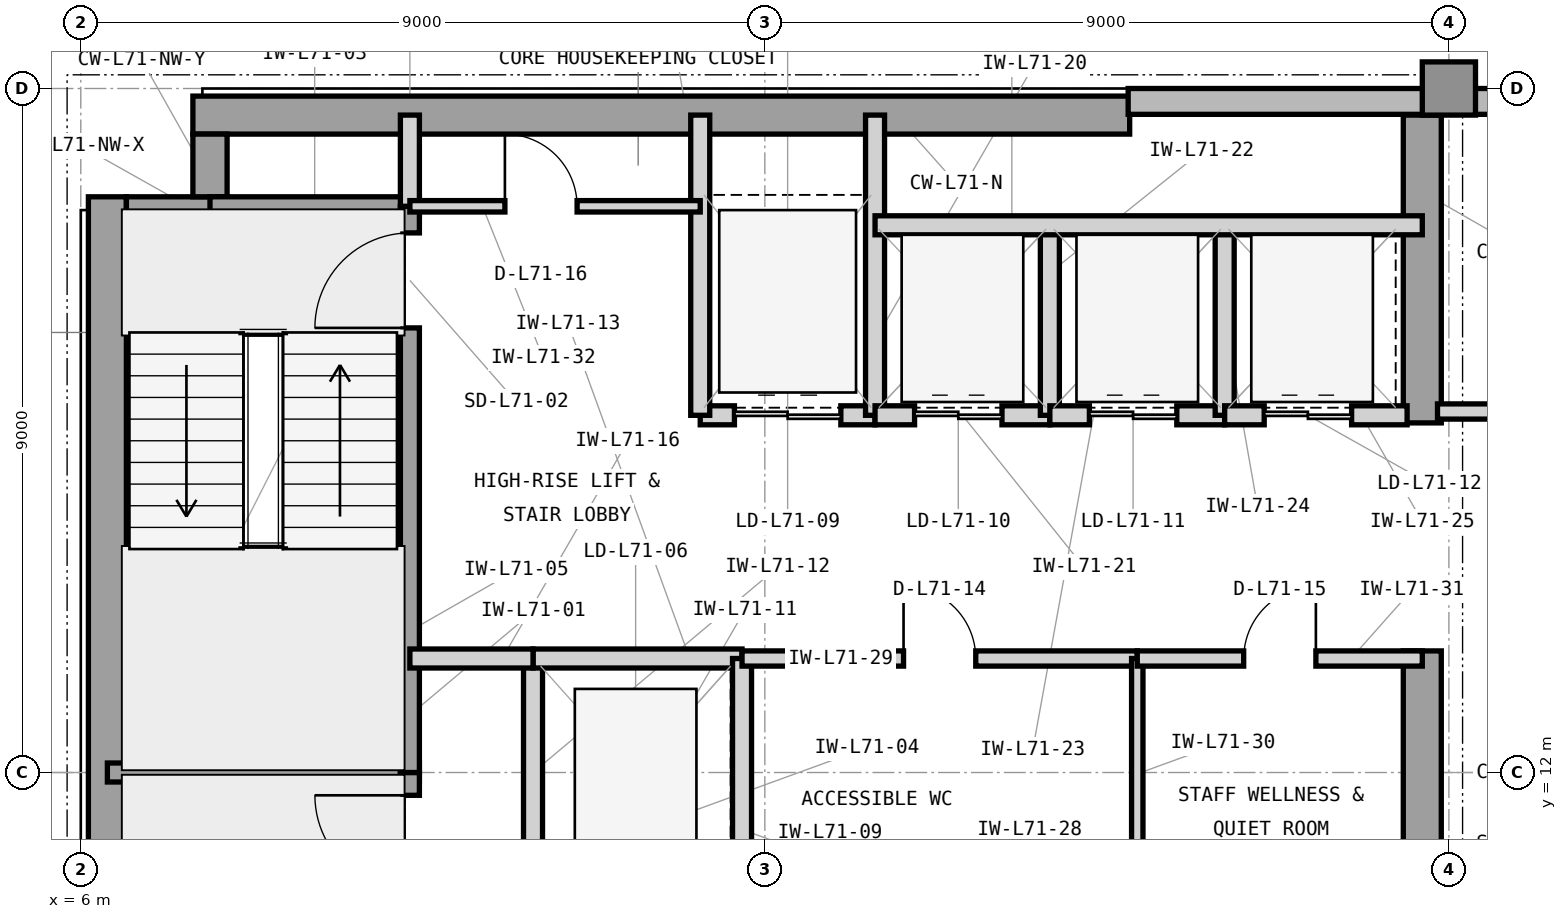
"""IFC4 building model, lengths in metres.
Left out: names, types, materials, properties, quantities, classifications, styles, units other than length and angle.
Written with IfcOpenShell. Run it as: python <this file> out.ifc"""

import sys

from ifc_helpers import new_model, si_unit, direction, frame, frame_2d, origin, origin_2d, place, context, subcontext, project, spatial, rectangle, extrude, element, fill, save


model = new_model("IFC4")
c1 = context("Model", 3, precision=1e-05, world=origin(), true_north=direction((0.0, 1.0)))
c2 = subcontext(c1, "Body", "Model", "MODEL_VIEW")
j1 = project(units=[si_unit("LENGTHUNIT", "METRE"), si_unit("PLANEANGLEUNIT", "RADIAN")], contexts=[c1])
p1 = place(None, origin())
s1 = spatial("IfcSite", under=j1, at=p1, CompositionType="ELEMENT")
p2 = place(p1, origin())
s2 = spatial("IfcBuilding", under=s1, at=p2, CompositionType="ELEMENT")
p3 = place(p2, frame((0.0, 0.0, 289.8)))
s3 = spatial("IfcBuildingStorey", under=s2, at=p3, CompositionType="ELEMENT", Elevation=289.8)
p4 = place(p3, frame((6.35, 4.425, 0.0), z_axis=(0.0, 0.0, 1.0), x_axis=(0.0, 1.0, 0.0)))
e1 = element("IfcWall", 1, at=p4, inside=s3, PredefinedType="SHEAR", context=c2, shape_type="SweptSolid", body=[
    extrude(rectangle(XDim=15.15, YDim=0.5, at=frame_2d((7.575, 0.0))), origin(), (0.0, 0.0, 1.0), 3.9),
])
p5 = place(p3, frame((7.475, 20.65, 0.0), z_axis=(0.0, 0.0, 1.0), x_axis=(1.0, 0.0, 0.0)))
e2 = element("IfcWall", 2, at=p5, inside=s3, PredefinedType="SHEAR", context=c2, shape_type="SweptSolid", body=[
    extrude(rectangle(XDim=12.325, YDim=0.5, at=frame_2d((6.163, 0.0))), origin(), (0.0, 0.0, 1.0), 3.9),
])
p6 = place(p3, frame((23.65, 10.4, 0.0), z_axis=(0.0, 0.0, 1.0), x_axis=(0.0, 1.0, 0.0)))
e3 = element("IfcWall", 3, at=p6, inside=s3, PredefinedType="SHEAR", context=c2, shape_type="SweptSolid", body=[
    extrude(rectangle(XDim=3.2, YDim=0.5, at=frame_2d((1.6, 0.0))), origin(), (0.0, 0.0, 1.0), 3.9),
])
p7 = place(p3, frame((23.65, 16.6, 0.0), z_axis=(0.0, 0.0, 1.0), x_axis=(0.0, 1.0, 0.0)))
e4 = element("IfcWall", 4, at=p7, inside=s3, PredefinedType="SHEAR", context=c2, shape_type="SweptSolid", body=[
    extrude(rectangle(XDim=4.05, YDim=0.5, at=frame_2d((2.025, 0.0))), origin(), (0.0, 0.0, 1.0), 3.9),
])
p8 = place(p3, frame((6.6, 19.35, 0.0), z_axis=(0.0, 0.0, 1.0), x_axis=(1.0, 0.0, 0.0)))
e5 = element("IfcWall", 5, at=p8, inside=s3, PredefinedType="SHEAR", context=c2, shape_type="SweptSolid", body=[
    extrude(rectangle(XDim=1.325, YDim=0.45, at=frame_2d((0.663, 0.0))), origin(), (0.0, 0.0, 1.0), 3.9),
])
p9 = place(p3, frame((7.7, 19.575, 0.0), z_axis=(0.0, 0.0, 1.0), x_axis=(0.0, 1.0, 0.0)))
e6 = element("IfcWall", 6, at=p9, inside=s3, PredefinedType="SHEAR", context=c2, shape_type="SweptSolid", body=[
    extrude(rectangle(XDim=0.825, YDim=0.45, at=frame_2d((0.413, 0.0))), origin(), (0.0, 0.0, 1.0), 3.9),
])
p10 = place(p3, frame((24.0, 21.0, 0.0), z_axis=(0.0, 0.0, 1.0), x_axis=(1.0, 0.0, 0.0)))
e7 = element("IfcColumn", 7, at=p10, inside=s3, PredefinedType="COLUMN", context=c2, shape_type="SweptSolid", body=[
    extrude(rectangle(XDim=0.7, YDim=0.7, at=origin_2d()), origin(), (0.0, 0.0, 1.0), 3.9),
])
p11 = place(p3, frame((49.4, 20.83, 0.0), z_axis=(0.0, 0.0, 1.0), x_axis=(-1.0, 0.0, 0.0)))
e8 = element("IfcWall", 8, at=p11, inside=s3, PredefinedType="STANDARD", context=c2, shape_type="SweptSolid", body=[
    extrude(rectangle(XDim=29.62, YDim=0.34, at=frame_2d((14.81, 0.0))), origin(), (0.0, 0.0, 1.0), 3.715),
])
p12 = place(p11, frame((22.826, 0.0, 0.8)))
e9 = element("IfcOpeningElement", 9, at=p12, cuts=e8, PredefinedType="OPENING", context=c2, shape_type="SweptSolid", body=[
    extrude(rectangle(XDim=1.9, YDim=2.35, at=frame_2d((0.95, 1.175))), frame((0.0, 0.18, 0.0), z_axis=(0.0, -1.0, 0.0), x_axis=(1.0, 0.0, 0.0)), (0.0, 0.0, 1.0), 0.36),
])
p13 = place(p11, frame((12.825, 0.0, 0.8)))
e10 = element("IfcOpeningElement", 10, at=p13, cuts=e8, PredefinedType="OPENING", context=c2, shape_type="SweptSolid", body=[
    extrude(rectangle(XDim=2.6, YDim=2.35, at=frame_2d((1.3, 1.175))), frame((0.0, 0.18, 0.0), z_axis=(0.0, -1.0, 0.0), x_axis=(1.0, 0.0, 0.0)), (0.0, 0.0, 1.0), 0.36),
])
p14 = place(p11, frame((8.375, 0.0, 0.8)))
e11 = element("IfcOpeningElement", 11, at=p14, cuts=e8, PredefinedType="OPENING", context=c2, shape_type="SweptSolid", body=[
    extrude(rectangle(XDim=2.6, YDim=2.35, at=frame_2d((1.3, 1.175))), frame((0.0, 0.18, 0.0), z_axis=(0.0, -1.0, 0.0), x_axis=(1.0, 0.0, 0.0)), (0.0, 0.0, 1.0), 0.36),
])
p15 = place(p3, frame((6.35, 12.0, 0.0), z_axis=(0.0, 0.0, 1.0), x_axis=(1.0, 0.0, 0.0)))
e12 = element("IfcWall", 12, at=p15, inside=s3, PredefinedType="SHEAR", context=c2, shape_type="SweptSolid", body=[
    extrude(rectangle(XDim=4.105, YDim=0.25, at=frame_2d((2.052, 0.0))), origin(), (0.0, 0.0, 1.0), 3.9),
])
p16 = place(p3, frame((7.7, 19.45, 0.0), z_axis=(0.0, 0.0, 1.0), x_axis=(1.0, 0.0, 0.0)))
e13 = element("IfcWall", 13, at=p16, inside=s3, PredefinedType="SHEAR", context=c2, shape_type="SweptSolid", body=[
    extrude(rectangle(XDim=2.755, YDim=0.25, at=frame_2d((1.377, 0.0))), origin(), (0.0, 0.0, 1.0), 3.9),
])
p17 = place(p3, frame((10.33, 4.55, 0.0), z_axis=(0.0, 0.0, 1.0), x_axis=(0.0, 1.0, 0.0)))
e14 = element("IfcWall", 14, at=p17, inside=s3, PredefinedType="SHEAR", context=c2, shape_type="SweptSolid", body=[
    extrude(rectangle(XDim=7.45, YDim=0.25, at=frame_2d((3.725, 0.0))), origin(), (0.0, 0.0, 1.0), 3.9),
])
p18 = place(p17, frame((5.9, 0.0, 0.0)))
e15 = element("IfcOpeningElement", 15, at=p18, cuts=e14, PredefinedType="OPENING", context=c2, shape_type="SweptSolid", body=[
    extrude(rectangle(XDim=1.25, YDim=2.2, at=frame_2d((0.625, 1.1))), frame((0.0, 0.135, 0.0), z_axis=(0.0, -1.0, 0.0), x_axis=(1.0, 0.0, 0.0)), (0.0, 0.0, 1.0), 0.27),
])
p19 = place(p3, frame((10.33, 12.0, 0.0), z_axis=(0.0, 0.0, 1.0), x_axis=(0.0, 1.0, 0.0)))
e16 = element("IfcWall", 16, at=p19, inside=s3, PredefinedType="SHEAR", context=c2, shape_type="SweptSolid", body=[
    extrude(rectangle(XDim=7.45, YDim=0.25, at=frame_2d((3.725, 0.0))), origin(), (0.0, 0.0, 1.0), 3.9),
])
p20 = place(p19, frame((5.85, 0.0, 0.0)))
e17 = element("IfcOpeningElement", 17, at=p20, cuts=e16, PredefinedType="OPENING", context=c2, shape_type="SweptSolid", body=[
    extrude(rectangle(XDim=1.25, YDim=2.2, at=frame_2d((0.625, 1.1))), frame((0.0, 0.135, 0.0), z_axis=(0.0, -1.0, 0.0), x_axis=(1.0, 0.0, 0.0)), (0.0, 0.0, 1.0), 0.27),
])
p21 = place(p3, frame((10.33, 19.45, 0.0), z_axis=(0.0, 0.0, 1.0), x_axis=(0.0, 1.0, 0.0)))
e18 = element("IfcWall", 18, at=p21, inside=s3, PredefinedType="PARTITIONING", context=c2, shape_type="SweptSolid", body=[
    extrude(rectangle(XDim=1.2, YDim=0.25, at=frame_2d((0.6, 0.0))), origin(), (0.0, 0.0, 1.0), 3.705),
])
p22 = place(p3, frame((11.95, 10.5, 0.0), z_axis=(0.0, 0.0, 1.0), x_axis=(0.0, 1.0, 0.0)))
e19 = element("IfcWall", 19, at=p22, inside=s3, PredefinedType="PARTITIONING", context=c2, shape_type="SweptSolid", body=[
    extrude(rectangle(XDim=3.0, YDim=0.25, at=frame_2d((1.5, 0.0))), origin(), (0.0, 0.0, 1.0), 3.705),
])
p23 = place(p3, frame((11.95, 13.5, 0.0), z_axis=(0.0, 0.0, 1.0), x_axis=(1.0, 0.0, 0.0)))
e20 = element("IfcWall", 20, at=p23, inside=s3, PredefinedType="PARTITIONING", context=c2, shape_type="SweptSolid", body=[
    extrude(rectangle(XDim=2.75, YDim=0.25, at=frame_2d((1.375, 0.0))), origin(), (0.0, 0.0, 1.0), 3.354),
])
p24 = place(p3, frame((14.7, 10.5, 0.0), z_axis=(0.0, 0.0, 1.0), x_axis=(0.0, 1.0, 0.0)))
e21 = element("IfcWall", 21, at=p24, inside=s3, PredefinedType="PARTITIONING", context=c2, shape_type="SweptSolid", body=[
    extrude(rectangle(XDim=3.0, YDim=0.25, at=frame_2d((1.5, 0.0))), origin(), (0.0, 0.0, 1.0), 3.705),
])
p25 = place(p3, frame((10.33, 13.5, 0.0), z_axis=(0.0, 0.0, 1.0), x_axis=(1.0, 0.0, 0.0)))
e22 = element("IfcWall", 22, at=p25, inside=s3, PredefinedType="PARTITIONING", context=c2, shape_type="SweptSolid", body=[
    extrude(rectangle(XDim=1.62, YDim=0.25, at=frame_2d((0.81, 0.0))), origin(), (0.0, 0.0, 1.0), 3.354),
])
p26 = place(p3, frame((14.15, 16.7, 0.0), z_axis=(0.0, 0.0, 1.0), x_axis=(1.0, 0.0, 0.0)))
e23 = element("IfcWall", 23, at=p26, inside=s3, PredefinedType="PARTITIONING", context=c2, shape_type="SweptSolid", body=[
    extrude(rectangle(XDim=2.3, YDim=0.25, at=frame_2d((1.15, 0.0))), origin(), (0.0, 0.0, 1.0), 3.354),
])
p27 = place(p26, frame((0.45, 0.0, 0.0)))
e24 = element("IfcOpeningElement", 24, at=p27, cuts=e23, PredefinedType="OPENING", context=c2, shape_type="SweptSolid", body=[
    extrude(rectangle(XDim=1.4, YDim=2.35, at=frame_2d((0.7, 1.175))), frame((0.0, 0.135, 0.0), z_axis=(0.0, -1.0, 0.0), x_axis=(1.0, 0.0, 0.0)), (0.0, 0.0, 1.0), 0.27),
])
for number, where, z_axis, x_axis in (
    (25, (14.15, 16.7, 0.0), (0.0, 0.0, 1.0), (0.0, 1.0, 0.0)),
    (26, (16.45, 16.7, 0.0), (0.0, 0.0, 1.0), (0.0, 1.0, 0.0)),
):
    element("IfcWall", number, at=place(p3, frame(where, z_axis=z_axis, x_axis=x_axis)), inside=s3, PredefinedType="PARTITIONING", context=c2, shape_type="SweptSolid", body=[
        extrude(rectangle(XDim=3.95, YDim=0.25, at=frame_2d((1.975, 0.0))), origin(), (0.0, 0.0, 1.0), 3.705),
    ])
p28 = place(p3, frame((16.45, 16.7, 0.0), z_axis=(0.0, 0.0, 1.0), x_axis=(1.0, 0.0, 0.0)))
e27 = element("IfcWall", 27, at=p28, inside=s3, PredefinedType="PARTITIONING", context=c2, shape_type="SweptSolid", body=[
    extrude(rectangle(XDim=2.3, YDim=0.25, at=frame_2d((1.15, 0.0))), origin(), (0.0, 0.0, 1.0), 3.354),
])
p29 = place(p28, frame((0.52, 0.0, 0.0)))
e28 = element("IfcOpeningElement", 28, at=p29, cuts=e27, PredefinedType="OPENING", context=c2, shape_type="SweptSolid", body=[
    extrude(rectangle(XDim=1.15, YDim=2.25, at=frame_2d((0.575, 1.125))), frame((0.0, 0.135, 0.0), z_axis=(0.0, -1.0, 0.0), x_axis=(1.0, 0.0, 0.0)), (0.0, 0.0, 1.0), 0.27),
])
p30 = place(p3, frame((18.75, 16.7, 0.0), z_axis=(0.0, 0.0, 1.0), x_axis=(0.0, 1.0, 0.0)))
e29 = element("IfcWall", 29, at=p30, inside=s3, PredefinedType="PARTITIONING", context=c2, shape_type="SweptSolid", body=[
    extrude(rectangle(XDim=2.5, YDim=0.25, at=frame_2d((1.25, 0.0))), origin(), (0.0, 0.0, 1.0), 3.705),
])
p31 = place(p3, frame((18.75, 16.7, 0.0), z_axis=(0.0, 0.0, 1.0), x_axis=(1.0, 0.0, 0.0)))
e30 = element("IfcWall", 30, at=p31, inside=s3, PredefinedType="PARTITIONING", context=c2, shape_type="SweptSolid", body=[
    extrude(rectangle(XDim=2.3, YDim=0.25, at=frame_2d((1.15, 0.0))), origin(), (0.0, 0.0, 1.0), 3.354),
])
p32 = place(p31, frame((0.52, 0.0, 0.0)))
e31 = element("IfcOpeningElement", 31, at=p32, cuts=e30, PredefinedType="OPENING", context=c2, shape_type="SweptSolid", body=[
    extrude(rectangle(XDim=1.15, YDim=2.25, at=frame_2d((0.575, 1.125))), frame((0.0, 0.135, 0.0), z_axis=(0.0, -1.0, 0.0), x_axis=(1.0, 0.0, 0.0)), (0.0, 0.0, 1.0), 0.27),
])
p33 = place(p3, frame((21.05, 16.7, 0.0), z_axis=(0.0, 0.0, 1.0), x_axis=(0.0, 1.0, 0.0)))
e32 = element("IfcWall", 32, at=p33, inside=s3, PredefinedType="PARTITIONING", context=c2, shape_type="SweptSolid", body=[
    extrude(rectangle(XDim=2.5, YDim=0.25, at=frame_2d((1.25, 0.0))), origin(), (0.0, 0.0, 1.0), 3.705),
])
p34 = place(p3, frame((21.05, 16.7, 0.0), z_axis=(0.0, 0.0, 1.0), x_axis=(1.0, 0.0, 0.0)))
e33 = element("IfcWall", 33, at=p34, inside=s3, PredefinedType="PARTITIONING", context=c2, shape_type="SweptSolid", body=[
    extrude(rectangle(XDim=2.4, YDim=0.25, at=frame_2d((1.2, 0.0))), origin(), (0.0, 0.0, 1.0), 3.354),
])
p35 = place(p34, frame((0.52, 0.0, 0.0)))
e34 = element("IfcOpeningElement", 34, at=p35, cuts=e33, PredefinedType="OPENING", context=c2, shape_type="SweptSolid", body=[
    extrude(rectangle(XDim=1.15, YDim=2.25, at=frame_2d((0.575, 1.125))), frame((0.0, 0.135, 0.0), z_axis=(0.0, -1.0, 0.0), x_axis=(1.0, 0.0, 0.0)), (0.0, 0.0, 1.0), 0.27),
])
p36 = place(p3, frame((16.45, 19.2, 0.0), z_axis=(0.0, 0.0, 1.0), x_axis=(1.0, 0.0, 0.0)))
e35 = element("IfcWall", 35, at=p36, inside=s3, PredefinedType="PARTITIONING", context=c2, shape_type="SweptSolid", body=[
    extrude(rectangle(XDim=7.2, YDim=0.25, at=frame_2d((3.6, 0.0))), origin(), (0.0, 0.0, 1.0), 3.705),
])
p37 = place(p3, frame((14.7, 13.5, 0.0), z_axis=(0.0, 0.0, 1.0), x_axis=(1.0, 0.0, 0.0)))
e36 = element("IfcWall", 36, at=p37, inside=s3, PredefinedType="PARTITIONING", context=c2, shape_type="SweptSolid", body=[
    extrude(rectangle(XDim=5.2, YDim=0.2, at=frame_2d((2.6, 0.0))), origin(), (0.0, 0.0, 1.0), 3.354),
])
p38 = place(p37, frame((2.125, 0.0, 0.0)))
e37 = element("IfcOpeningElement", 37, at=p38, cuts=e36, PredefinedType="OPENING", context=c2, shape_type="SweptSolid", body=[
    extrude(rectangle(XDim=0.95, YDim=2.1, at=frame_2d((0.475, 1.05))), frame((0.0, 0.11, 0.0), z_axis=(0.0, -1.0, 0.0), x_axis=(1.0, 0.0, 0.0)), (0.0, 0.0, 1.0), 0.22),
])
p39 = place(p3, frame((19.9, 10.465, 0.0), z_axis=(0.0, 0.0, 1.0), x_axis=(0.0, 1.0, 0.0)))
e38 = element("IfcWall", 38, at=p39, inside=s3, PredefinedType="PARTITIONING", context=c2, shape_type="SweptSolid", body=[
    extrude(rectangle(XDim=3.035, YDim=0.15, at=frame_2d((1.518, 0.0))), origin(), (0.0, 0.0, 1.0), 3.705),
])
p40 = place(p3, frame((19.9, 13.5, 0.0), z_axis=(0.0, 0.0, 1.0), x_axis=(1.0, 0.0, 0.0)))
e39 = element("IfcWall", 39, at=p40, inside=s3, PredefinedType="PARTITIONING", context=c2, shape_type="SweptSolid", body=[
    extrude(rectangle(XDim=3.75, YDim=0.2, at=frame_2d((1.875, 0.0))), origin(), (0.0, 0.0, 1.0), 3.354),
])
p41 = place(p40, frame((1.4, 0.0, 0.0)))
e40 = element("IfcOpeningElement", 40, at=p41, cuts=e39, PredefinedType="OPENING", context=c2, shape_type="SweptSolid", body=[
    extrude(rectangle(XDim=0.95, YDim=2.1, at=frame_2d((0.475, 1.05))), frame((0.0, 0.11, 0.0), z_axis=(0.0, -1.0, 0.0), x_axis=(1.0, 0.0, 0.0)), (0.0, 0.0, 1.0), 0.22),
])
p42 = place(p3, frame((10.33, 19.45, 0.0), z_axis=(0.0, 0.0, 1.0), x_axis=(1.0, 0.0, 0.0)))
e41 = element("IfcWall", 41, at=p42, inside=s3, PredefinedType="PARTITIONING", context=c2, shape_type="SweptSolid", body=[
    extrude(rectangle(XDim=3.82, YDim=0.15, at=frame_2d((1.91, 0.0))), origin(), (0.0, 0.0, 1.0), 3.705),
])
p43 = place(p42, frame((1.25, 0.0, 0.0)))
e42 = element("IfcOpeningElement", 42, at=p43, cuts=e41, PredefinedType="OPENING", context=c2, shape_type="SweptSolid", body=[
    extrude(rectangle(XDim=0.95, YDim=2.1, at=frame_2d((0.475, 1.05))), frame((0.0, 0.085, 0.0), z_axis=(0.0, -1.0, 0.0), x_axis=(1.0, 0.0, 0.0)), (0.0, 0.0, 1.0), 0.17),
])
p44 = place(p3, frame((23.85, 16.75, 0.0), z_axis=(0.0, 0.0, 1.0), x_axis=(1.0, 0.0, 0.0)))
e43 = element("IfcWall", 43, at=p44, inside=s3, PredefinedType="PARTITIONING", context=c2, shape_type="SweptSolid", body=[
    extrude(rectangle(XDim=3.05, YDim=0.2, at=frame_2d((1.525, 0.0))), origin(), (0.0, 0.0, 1.0), 3.705),
])
p45 = place(p44, frame((0.9, 0.0, 0.0)))
e44 = element("IfcOpeningElement", 44, at=p45, cuts=e43, PredefinedType="OPENING", context=c2, shape_type="SweptSolid", body=[
    extrude(rectangle(XDim=1.0, YDim=2.15, at=frame_2d((0.5, 1.075))), frame((0.0, 0.11, 0.0), z_axis=(0.0, -1.0, 0.0), x_axis=(1.0, 0.0, 0.0)), (0.0, 0.0, 1.0), 0.22),
])
p46 = place(p18, origin())
e45 = element("IfcDoor", 45, at=p46, inside=s3, OperationType="SINGLE_SWING_RIGHT", PredefinedType="DOOR", context=c2, shape_type="SweptSolid", body=[
    extrude(rectangle(XDim=1.25, YDim=2.2, at=frame_2d((0.625, 1.1))), frame((0.0, 0.025, 0.0), z_axis=(0.0, -1.0, 0.0), x_axis=(1.0, 0.0, 0.0)), (0.0, 0.0, 1.0), 0.05),
])
fill(e15, e45)
p47 = place(p20, origin())
e46 = element("IfcDoor", 46, at=p47, inside=s3, OperationType="SINGLE_SWING_LEFT", PredefinedType="DOOR", context=c2, shape_type="SweptSolid", body=[
    extrude(rectangle(XDim=1.25, YDim=2.2, at=frame_2d((0.625, 1.1))), frame((0.0, 0.025, 0.0), z_axis=(0.0, -1.0, 0.0), x_axis=(1.0, 0.0, 0.0)), (0.0, 0.0, 1.0), 0.05),
])
fill(e17, e46)
p48 = place(p27, origin())
e47 = element("IfcDoor", 47, at=p48, inside=s3, OperationType="DOUBLE_DOOR_SLIDING", PredefinedType="DOOR", context=c2, shape_type="SweptSolid", body=[
    extrude(rectangle(XDim=1.4, YDim=2.35, at=frame_2d((0.7, 1.175))), frame((0.0, 0.025, 0.0), z_axis=(0.0, -1.0, 0.0), x_axis=(1.0, 0.0, 0.0)), (0.0, 0.0, 1.0), 0.05),
])
fill(e24, e47)
p49 = place(p29, origin())
e48 = element("IfcDoor", 48, at=p49, inside=s3, OperationType="DOUBLE_DOOR_SLIDING", PredefinedType="DOOR", context=c2, shape_type="SweptSolid", body=[
    extrude(rectangle(XDim=1.15, YDim=2.25, at=frame_2d((0.575, 1.125))), frame((0.0, 0.025, 0.0), z_axis=(0.0, -1.0, 0.0), x_axis=(1.0, 0.0, 0.0)), (0.0, 0.0, 1.0), 0.05),
])
fill(e28, e48)
p50 = place(p32, origin())
e49 = element("IfcDoor", 49, at=p50, inside=s3, OperationType="DOUBLE_DOOR_SLIDING", PredefinedType="DOOR", context=c2, shape_type="SweptSolid", body=[
    extrude(rectangle(XDim=1.15, YDim=2.25, at=frame_2d((0.575, 1.125))), frame((0.0, 0.025, 0.0), z_axis=(0.0, -1.0, 0.0), x_axis=(1.0, 0.0, 0.0)), (0.0, 0.0, 1.0), 0.05),
])
fill(e31, e49)
p51 = place(p35, origin())
e50 = element("IfcDoor", 50, at=p51, inside=s3, OperationType="DOUBLE_DOOR_SLIDING", PredefinedType="DOOR", context=c2, shape_type="SweptSolid", body=[
    extrude(rectangle(XDim=1.15, YDim=2.25, at=frame_2d((0.575, 1.125))), frame((0.0, 0.025, 0.0), z_axis=(0.0, -1.0, 0.0), x_axis=(1.0, 0.0, 0.0)), (0.0, 0.0, 1.0), 0.05),
])
fill(e34, e50)
p52 = place(p38, origin())
e51 = element("IfcDoor", 51, at=p52, inside=s3, OperationType="SINGLE_SWING_LEFT", PredefinedType="DOOR", context=c2, shape_type="SweptSolid", body=[
    extrude(rectangle(XDim=0.95, YDim=2.1, at=frame_2d((0.475, 1.05))), frame((0.0, 0.025, 0.0), z_axis=(0.0, -1.0, 0.0), x_axis=(1.0, 0.0, 0.0)), (0.0, 0.0, 1.0), 0.05),
])
fill(e37, e51)
p53 = place(p41, origin())
e52 = element("IfcDoor", 52, at=p53, inside=s3, OperationType="SINGLE_SWING_RIGHT", PredefinedType="DOOR", context=c2, shape_type="SweptSolid", body=[
    extrude(rectangle(XDim=0.95, YDim=2.1, at=frame_2d((0.475, 1.05))), frame((0.0, 0.025, 0.0), z_axis=(0.0, -1.0, 0.0), x_axis=(1.0, 0.0, 0.0)), (0.0, 0.0, 1.0), 0.05),
])
fill(e40, e52)
p54 = place(p43, origin())
e53 = element("IfcDoor", 53, at=p54, inside=s3, OperationType="SINGLE_SWING_LEFT", PredefinedType="DOOR", context=c2, shape_type="SweptSolid", body=[
    extrude(rectangle(XDim=0.95, YDim=2.1, at=frame_2d((0.475, 1.05))), frame((0.0, 0.025, 0.0), z_axis=(0.0, -1.0, 0.0), x_axis=(1.0, 0.0, 0.0)), (0.0, 0.0, 1.0), 0.05),
])
fill(e42, e53)
save(model, sys.argv[1])
